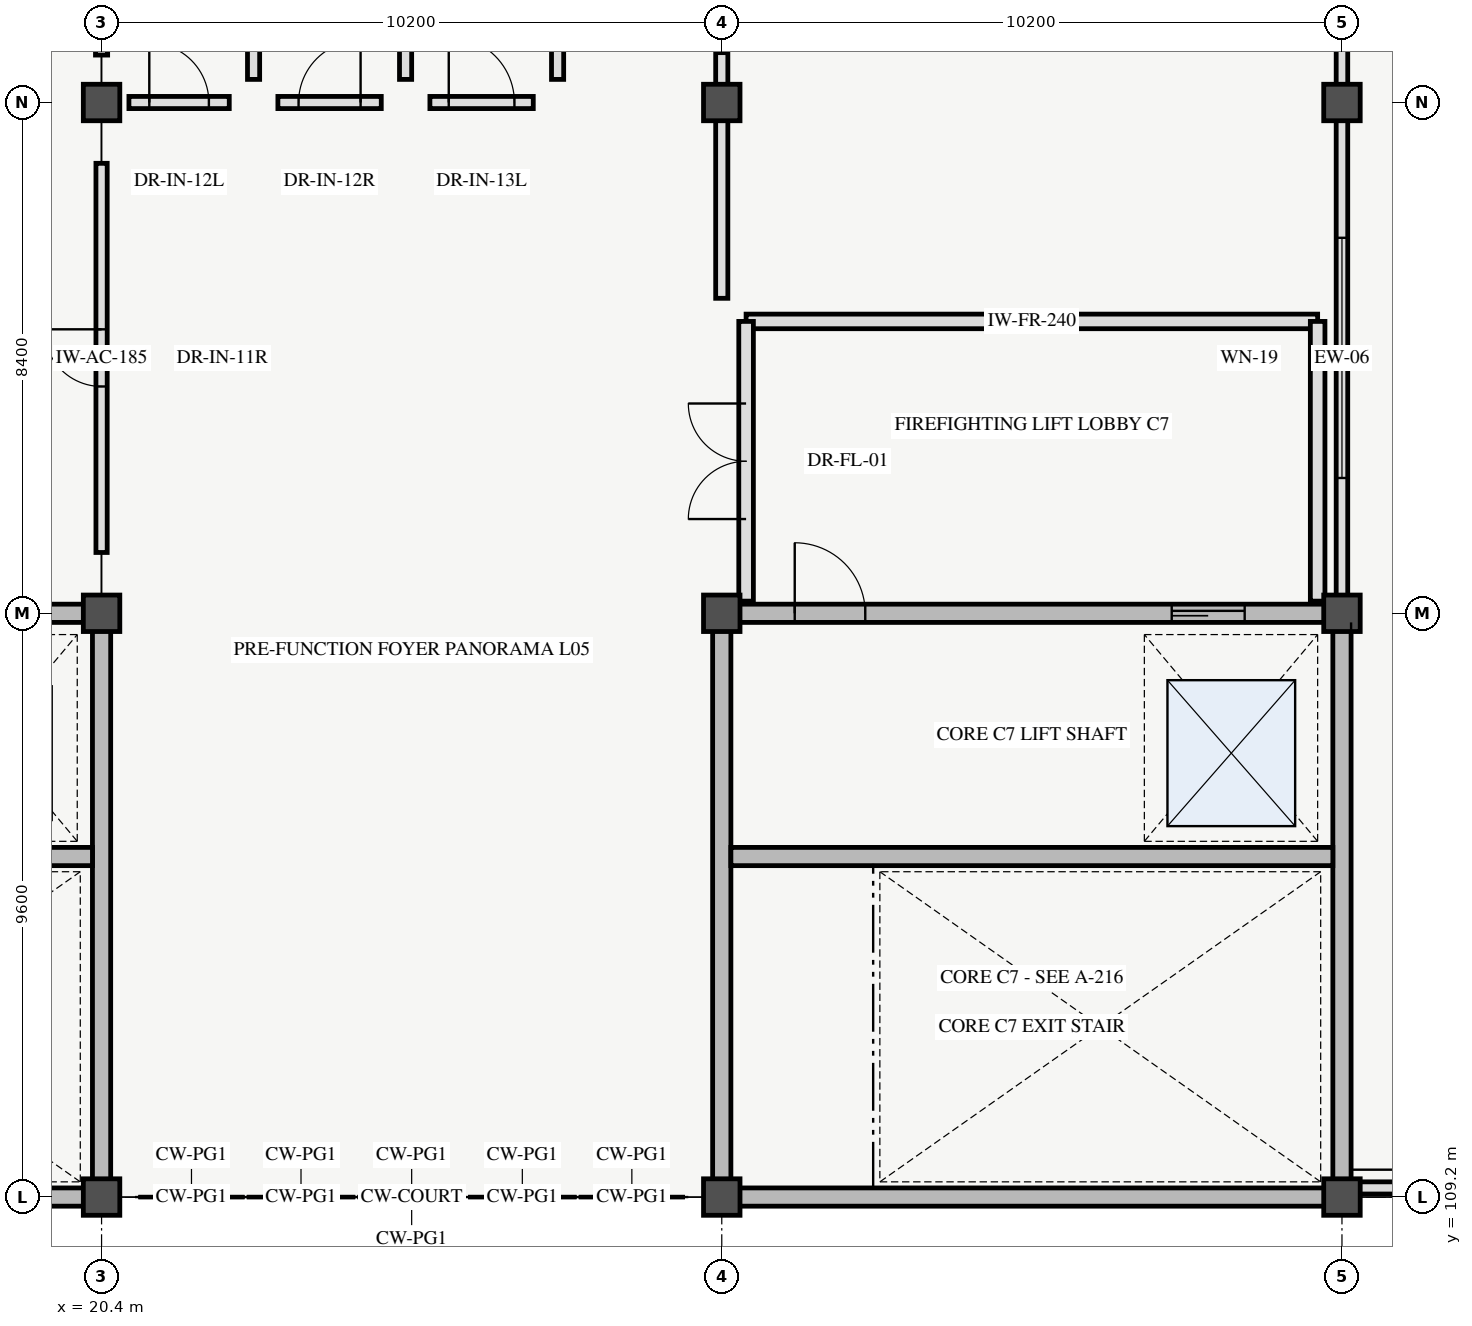
"""IFC4 building model, lengths in metres.
Left out: names, types, materials, properties, quantities, classifications, styles, units other than length and angle.
Written with IfcOpenShell. Run it as: python <this file> out.ifc"""

import sys

from ifc_helpers import new_model, si_unit, direction, frame, frame_2d, origin, origin_2d, place, context, subcontext, project, spatial, rectangle, extrude, element, fill, save


model = new_model("IFC4")
c1 = context("Model", 3, precision=1e-05, world=origin(), true_north=direction((0.0, 1.0)))
c2 = subcontext(c1, "Body", "Model", "MODEL_VIEW")
j1 = project(units=[si_unit("LENGTHUNIT", "METRE"), si_unit("PLANEANGLEUNIT", "RADIAN")], contexts=[c1])
p1 = place(None, origin())
s1 = spatial("IfcSite", under=j1, at=p1, CompositionType="ELEMENT")
p2 = place(p1, origin())
s2 = spatial("IfcBuilding", under=s1, at=p2, CompositionType="ELEMENT")
p3 = place(p2, frame((0.0, 0.0, 23.4)))
s3 = spatial("IfcBuildingStorey", under=s2, at=p3, CompositionType="ELEMENT", Elevation=23.4)
for number, where, z_axis, x_axis in (
    (1, (20.4, 109.2, 0.0), (0.0, 0.0, 1.0), (1.0, 0.0, 0.0)),
    (2, (20.4, 118.8, 0.0), (0.0, 0.0, 1.0), (1.0, 0.0, 0.0)),
    (3, (20.4, 127.2, 0.0), (0.0, 0.0, 1.0), (1.0, 0.0, 0.0)),
    (4, (30.6, 109.2, 0.0), (0.0, 0.0, 1.0), (1.0, 0.0, 0.0)),
    (5, (30.6, 118.8, 0.0), (0.0, 0.0, 1.0), (1.0, 0.0, 0.0)),
    (6, (30.6, 127.2, 0.0), (0.0, 0.0, 1.0), (1.0, 0.0, 0.0)),
    (7, (40.8, 109.2, 0.0), (0.0, 0.0, 1.0), (1.0, 0.0, 0.0)),
    (8, (40.8, 118.8, 0.0), (0.0, 0.0, 1.0), (1.0, 0.0, 0.0)),
    (9, (40.8, 127.2, 0.0), (0.0, 0.0, 1.0), (1.0, 0.0, 0.0)),
):
    element("IfcColumn", number, at=place(p3, frame(where, z_axis=z_axis, x_axis=x_axis)), inside=s3, PredefinedType="COLUMN", context=c2, shape_type="SweptSolid", body=[
        extrude(rectangle(XDim=0.6, YDim=0.6, at=origin_2d()), origin(), (0.0, 0.0, 1.0), 4.2),
    ])
p4 = place(p3, frame((10.2, 109.2, 0.0), z_axis=(0.0, 0.0, 1.0), x_axis=(1.0, 0.0, 0.0)))
e10 = element("IfcWall", 10, at=p4, inside=s3, PredefinedType="SHEAR", context=c2, shape_type="SweptSolid", body=[
    extrude(rectangle(XDim=10.2, YDim=0.3, at=frame_2d((5.1, 0.0))), origin(), (0.0, 0.0, 1.0), 4.2),
])
p5 = place(p3, frame((10.2, 118.8, 0.0), z_axis=(0.0, 0.0, 1.0), x_axis=(1.0, 0.0, 0.0)))
e11 = element("IfcWall", 11, at=p5, inside=s3, PredefinedType="SHEAR", context=c2, shape_type="SweptSolid", body=[
    extrude(rectangle(XDim=10.2, YDim=0.3, at=frame_2d((5.1, 0.0))), origin(), (0.0, 0.0, 1.0), 4.2),
])
p6 = place(p5, frame((1.2, 0.0, 0.0)))
e12 = element("IfcOpeningElement", 12, at=p6, cuts=e11, PredefinedType="OPENING", context=c2, shape_type="SweptSolid", body=[
    extrude(rectangle(XDim=1.16, YDim=2.2, at=frame_2d((0.58, 1.1))), frame((0.0, 0.16, 0.0), z_axis=(0.0, -1.0, 0.0), x_axis=(1.0, 0.0, 0.0)), (0.0, 0.0, 1.0), 0.32),
])
p7 = place(p5, frame((7.4, 0.0, 0.0)))
e13 = element("IfcOpeningElement", 13, at=p7, cuts=e11, PredefinedType="OPENING", context=c2, shape_type="SweptSolid", body=[
    extrude(rectangle(XDim=1.1, YDim=2.2, at=frame_2d((0.55, 1.1))), frame((0.0, 0.16, 0.0), z_axis=(0.0, -1.0, 0.0), x_axis=(1.0, 0.0, 0.0)), (0.0, 0.0, 1.0), 0.32),
])
p8 = place(p3, frame((20.4, 109.2, 0.0), z_axis=(0.0, 0.0, 1.0), x_axis=(0.0, 1.0, 0.0)))
e14 = element("IfcWall", 14, at=p8, inside=s3, PredefinedType="SHEAR", context=c2, shape_type="SweptSolid", body=[
    extrude(rectangle(XDim=9.6, YDim=0.3, at=frame_2d((4.8, 0.0))), origin(), (0.0, 0.0, 1.0), 4.2),
])
p9 = place(p3, frame((30.6, 109.2, 0.0), z_axis=(0.0, 0.0, 1.0), x_axis=(1.0, 0.0, 0.0)))
e15 = element("IfcWall", 15, at=p9, inside=s3, PredefinedType="SHEAR", context=c2, shape_type="SweptSolid", body=[
    extrude(rectangle(XDim=10.2, YDim=0.3, at=frame_2d((5.1, 0.0))), origin(), (0.0, 0.0, 1.0), 4.2),
])
p10 = place(p3, frame((30.6, 118.8, 0.0), z_axis=(0.0, 0.0, 1.0), x_axis=(1.0, 0.0, 0.0)))
e16 = element("IfcWall", 16, at=p10, inside=s3, PredefinedType="SHEAR", context=c2, shape_type="SweptSolid", body=[
    extrude(rectangle(XDim=10.2, YDim=0.3, at=frame_2d((5.1, 0.0))), origin(), (0.0, 0.0, 1.0), 4.2),
])
p11 = place(p10, frame((1.2, 0.0, 0.0)))
e17 = element("IfcOpeningElement", 17, at=p11, cuts=e16, PredefinedType="OPENING", context=c2, shape_type="SweptSolid", body=[
    extrude(rectangle(XDim=1.16, YDim=2.2, at=frame_2d((0.58, 1.1))), frame((0.0, 0.16, 0.0), z_axis=(0.0, -1.0, 0.0), x_axis=(1.0, 0.0, 0.0)), (0.0, 0.0, 1.0), 0.32),
])
p12 = place(p10, frame((7.4, 0.0, 0.0)))
e18 = element("IfcOpeningElement", 18, at=p12, cuts=e16, PredefinedType="OPENING", context=c2, shape_type="SweptSolid", body=[
    extrude(rectangle(XDim=1.2, YDim=2.25, at=frame_2d((0.6, 1.125))), frame((0.0, 0.16, 0.0), z_axis=(0.0, -1.0, 0.0), x_axis=(1.0, 0.0, 0.0)), (0.0, 0.0, 1.0), 0.32),
])
for number, where, z_axis, x_axis in (
    (19, (30.6, 109.2, 0.0), (0.0, 0.0, 1.0), (0.0, 1.0, 0.0)),
    (20, (40.8, 109.2, 0.0), (0.0, 0.0, 1.0), (0.0, 1.0, 0.0)),
):
    element("IfcWall", number, at=place(p3, frame(where, z_axis=z_axis, x_axis=x_axis)), inside=s3, PredefinedType="SHEAR", context=c2, shape_type="SweptSolid", body=[
        extrude(rectangle(XDim=9.6, YDim=0.3, at=frame_2d((4.8, 0.0))), origin(), (0.0, 0.0, 1.0), 4.2),
    ])
p13 = place(p3, frame((40.8, 119.04, 0.0), z_axis=(0.0, 0.0, 1.0), x_axis=(0.0, 1.0, 0.0)))
e21 = element("IfcWall", 21, at=p13, inside=s3, PredefinedType="STANDARD", context=c2, shape_type="SweptSolid", body=[
    extrude(rectangle(XDim=7.92, YDim=0.19, at=frame_2d((3.96, 0.0))), origin(), (0.0, 0.0, 1.0), 3.06),
])
p14 = place(p13, frame((1.985, 0.0, 0.9)))
e22 = element("IfcOpeningElement", 22, at=p14, cuts=e21, PredefinedType="OPENING", context=c2, shape_type="SweptSolid", body=[
    extrude(rectangle(XDim=3.95, YDim=2.02, at=frame_2d((1.975, 1.01))), frame((0.0, 0.105, 0.0), z_axis=(0.0, -1.0, 0.0), x_axis=(1.0, 0.0, 0.0)), (0.0, 0.0, 1.0), 0.21),
])
p15 = place(p3, frame((40.8, 127.44, 0.0), z_axis=(0.0, 0.0, 1.0), x_axis=(0.0, 1.0, 0.0)))
e23 = element("IfcWall", 23, at=p15, inside=s3, PredefinedType="STANDARD", context=c2, shape_type="SweptSolid", body=[
    extrude(rectangle(XDim=7.92, YDim=0.19, at=frame_2d((3.96, 0.0))), origin(), (0.0, 0.0, 1.0), 3.06),
])
p16 = place(p15, frame((2.91, 0.0, 0.0)))
e24 = element("IfcOpeningElement", 24, at=p16, cuts=e23, PredefinedType="OPENING", context=c2, shape_type="SweptSolid", body=[
    extrude(rectangle(XDim=2.1, YDim=2.3, at=frame_2d((1.05, 1.15))), frame((0.0, 0.105, 0.0), z_axis=(0.0, -1.0, 0.0), x_axis=(1.0, 0.0, 0.0)), (0.0, 0.0, 1.0), 0.21),
])
p17 = place(p3, frame((40.95, 109.35, 0.0), z_axis=(0.0, 0.0, 1.0), x_axis=(1.0, 0.0, 0.0)))
e25 = element("IfcWall", 25, at=p17, inside=s3, PredefinedType="PARAPET", context=c2, shape_type="SweptSolid", body=[
    extrude(rectangle(XDim=30.3, YDim=0.2, at=frame_2d((15.15, 0.0))), origin(), (0.0, 0.0, 1.0), 1.1),
])
for number, where, z_axis, x_axis in (
    (26, (10.35, 114.8, 0.0), (0.0, 0.0, 1.0), (1.0, 0.0, 0.0)),
    (27, (30.75, 114.8, 0.0), (0.0, 0.0, 1.0), (1.0, 0.0, 0.0)),
):
    element("IfcWall", number, at=place(p3, frame(where, z_axis=z_axis, x_axis=x_axis)), inside=s3, PredefinedType="SHEAR", context=c2, shape_type="SweptSolid", body=[
        extrude(rectangle(XDim=9.9, YDim=0.3, at=frame_2d((4.95, 0.0))), origin(), (0.0, 0.0, 1.0), 4.2),
    ])
p18 = place(p3, frame((31.0, 123.6, 0.0), z_axis=(0.0, 0.0, 1.0), x_axis=(1.0, 0.0, 0.0)))
e28 = element("IfcWall", 28, at=p18, inside=s3, PredefinedType="PARTITIONING", context=c2, shape_type="SweptSolid", body=[
    extrude(rectangle(XDim=9.4, YDim=0.24, at=frame_2d((4.7, 0.0))), origin(), (0.0, 0.0, 1.0), 3.06),
])
p19 = place(p3, frame((40.4, 119.0, 0.0), z_axis=(0.0, 0.0, 1.0), x_axis=(0.0, 1.0, 0.0)))
e29 = element("IfcWall", 29, at=p19, inside=s3, PredefinedType="PARTITIONING", context=c2, shape_type="SweptSolid", body=[
    extrude(rectangle(XDim=4.6, YDim=0.24, at=frame_2d((2.3, 0.0))), origin(), (0.0, 0.0, 1.0), 3.06),
])
p20 = place(p3, frame((31.0, 119.0, 0.0), z_axis=(0.0, 0.0, 1.0), x_axis=(0.0, 1.0, 0.0)))
e30 = element("IfcWall", 30, at=p20, inside=s3, PredefinedType="PARTITIONING", context=c2, shape_type="SweptSolid", body=[
    extrude(rectangle(XDim=4.6, YDim=0.24, at=frame_2d((2.3, 0.0))), origin(), (0.0, 0.0, 1.0), 3.06),
])
p21 = place(p20, frame((1.35, 0.0, 0.0)))
e31 = element("IfcOpeningElement", 31, at=p21, cuts=e30, PredefinedType="OPENING", context=c2, shape_type="SweptSolid", body=[
    extrude(rectangle(XDim=1.9, YDim=2.25, at=frame_2d((0.95, 1.125))), frame((0.0, 0.13, 0.0), z_axis=(0.0, -1.0, 0.0), x_axis=(1.0, 0.0, 0.0)), (0.0, 0.0, 1.0), 0.26),
])
p22 = place(p3, frame((20.4, 119.8, 0.0), z_axis=(0.0, 0.0, 1.0), x_axis=(0.0, 1.0, 0.0)))
e32 = element("IfcWall", 32, at=p22, inside=s3, PredefinedType="PARTITIONING", context=c2, shape_type="SweptSolid", body=[
    extrude(rectangle(XDim=6.4, YDim=0.185, at=frame_2d((3.2, 0.0))), origin(), (0.0, 0.0, 1.0), 3.06),
])
p23 = place(p22, frame((2.73, 0.0, 0.0)))
e33 = element("IfcOpeningElement", 33, at=p23, cuts=e32, PredefinedType="OPENING", context=c2, shape_type="SweptSolid", body=[
    extrude(rectangle(XDim=0.94, YDim=2.08, at=frame_2d((0.47, 1.04))), frame((0.0, 0.103, 0.0), z_axis=(0.0, -1.0, 0.0), x_axis=(1.0, 0.0, 0.0)), (0.0, 0.0, 1.0), 0.205),
])
p24 = place(p3, frame((20.85, 127.2, 0.0), z_axis=(0.0, 0.0, 1.0), x_axis=(1.0, 0.0, 0.0)))
e34 = element("IfcWall", 34, at=p24, inside=s3, PredefinedType="PARTITIONING", context=c2, shape_type="SweptSolid", body=[
    extrude(rectangle(XDim=1.65, YDim=0.2, at=frame_2d((0.825, 0.0))), origin(), (0.0, 0.0, 1.0), 3.06),
])
p25 = place(p24, frame((0.335, 0.0, 0.0)))
e35 = element("IfcOpeningElement", 35, at=p25, cuts=e34, PredefinedType="OPENING", context=c2, shape_type="SweptSolid", body=[
    extrude(rectangle(XDim=0.98, YDim=2.12, at=frame_2d((0.49, 1.06))), frame((0.0, 0.11, 0.0), z_axis=(0.0, -1.0, 0.0), x_axis=(1.0, 0.0, 0.0)), (0.0, 0.0, 1.0), 0.22),
])
p26 = place(p3, frame((23.3, 127.2, 0.0), z_axis=(0.0, 0.0, 1.0), x_axis=(1.0, 0.0, 0.0)))
e36 = element("IfcWall", 36, at=p26, inside=s3, PredefinedType="PARTITIONING", context=c2, shape_type="SweptSolid", body=[
    extrude(rectangle(XDim=1.7, YDim=0.2, at=frame_2d((0.85, 0.0))), origin(), (0.0, 0.0, 1.0), 3.06),
])
p27 = place(p26, frame((0.34, 0.0, 0.0)))
e37 = element("IfcOpeningElement", 37, at=p27, cuts=e36, PredefinedType="OPENING", context=c2, shape_type="SweptSolid", body=[
    extrude(rectangle(XDim=1.02, YDim=2.12, at=frame_2d((0.51, 1.06))), frame((0.0, 0.11, 0.0), z_axis=(0.0, -1.0, 0.0), x_axis=(1.0, 0.0, 0.0)), (0.0, 0.0, 1.0), 0.22),
])
p28 = place(p3, frame((25.8, 127.2, 0.0), z_axis=(0.0, 0.0, 1.0), x_axis=(1.0, 0.0, 0.0)))
e38 = element("IfcWall", 38, at=p28, inside=s3, PredefinedType="PARTITIONING", context=c2, shape_type="SweptSolid", body=[
    extrude(rectangle(XDim=1.7, YDim=0.2, at=frame_2d((0.85, 0.0))), origin(), (0.0, 0.0, 1.0), 3.06),
])
p29 = place(p28, frame((0.31, 0.0, 0.0)))
e39 = element("IfcOpeningElement", 39, at=p29, cuts=e38, PredefinedType="OPENING", context=c2, shape_type="SweptSolid", body=[
    extrude(rectangle(XDim=1.08, YDim=2.18, at=frame_2d((0.54, 1.09))), frame((0.0, 0.11, 0.0), z_axis=(0.0, -1.0, 0.0), x_axis=(1.0, 0.0, 0.0)), (0.0, 0.0, 1.0), 0.22),
])
p30 = place(p3, frame((20.4, 127.98, 0.0), z_axis=(0.0, 0.0, 1.0), x_axis=(0.0, 1.0, 0.0)))
e40 = element("IfcWall", 40, at=p30, inside=s3, PredefinedType="PARTITIONING", context=c2, shape_type="SweptSolid", body=[
    extrude(rectangle(XDim=7.24, YDim=0.2, at=frame_2d((3.62, 0.0))), origin(), (0.0, 0.0, 1.0), 3.06),
])
for number, where, z_axis, x_axis in (
    (41, (22.9, 127.58, 0.0), (0.0, 0.0, 1.0), (0.0, 1.0, 0.0)),
    (42, (25.4, 127.58, 0.0), (0.0, 0.0, 1.0), (0.0, 1.0, 0.0)),
    (43, (27.9, 127.58, 0.0), (0.0, 0.0, 1.0), (0.0, 1.0, 0.0)),
):
    element("IfcWall", number, at=place(p3, frame(where, z_axis=z_axis, x_axis=x_axis)), inside=s3, PredefinedType="PARTITIONING", context=c2, shape_type="SweptSolid", body=[
        extrude(rectangle(XDim=7.64, YDim=0.2, at=frame_2d((3.82, 0.0))), origin(), (0.0, 0.0, 1.0), 3.06),
    ])
p31 = place(p3, frame((30.6, 123.98, 0.0), z_axis=(0.0, 0.0, 1.0), x_axis=(0.0, 1.0, 0.0)))
e44 = element("IfcWall", 44, at=p31, inside=s3, PredefinedType="PARTITIONING", context=c2, shape_type="SweptSolid", body=[
    extrude(rectangle(XDim=4.04, YDim=0.2, at=frame_2d((2.02, 0.0))), origin(), (0.0, 0.0, 1.0), 3.06),
])
p32 = place(p14, origin())
e45 = element("IfcWindow", 45, at=p32, inside=s3, PartitioningType="TRIPLE_PANEL_VERTICAL", PredefinedType="WINDOW", context=c2, shape_type="SweptSolid", body=[
    extrude(rectangle(XDim=3.95, YDim=2.02, at=frame_2d((1.975, 1.01))), frame((0.0, 0.03, 0.0), z_axis=(0.0, -1.0, 0.0), x_axis=(1.0, 0.0, 0.0)), (0.0, 0.0, 1.0), 0.06),
])
fill(e22, e45)
p33 = place(p11, origin())
e46 = element("IfcDoor", 46, at=p33, inside=s3, OperationType="SINGLE_SWING_LEFT", PredefinedType="DOOR", context=c2, shape_type="SweptSolid", body=[
    extrude(rectangle(XDim=1.16, YDim=2.2, at=frame_2d((0.58, 1.1))), frame((0.0, 0.025, 0.0), z_axis=(0.0, -1.0, 0.0), x_axis=(1.0, 0.0, 0.0)), (0.0, 0.0, 1.0), 0.05),
])
fill(e17, e46)
p34 = place(p12, origin())
e47 = element("IfcDoor", 47, at=p34, inside=s3, OperationType="SLIDING_TO_LEFT", PredefinedType="DOOR", context=c2, shape_type="SweptSolid", body=[
    extrude(rectangle(XDim=1.2, YDim=2.25, at=frame_2d((0.6, 1.125))), frame((0.0, 0.025, 0.0), z_axis=(0.0, -1.0, 0.0), x_axis=(1.0, 0.0, 0.0)), (0.0, 0.0, 1.0), 0.05),
])
fill(e18, e47)
p35 = place(p21, origin())
e48 = element("IfcDoor", 48, at=p35, inside=s3, OperationType="DOUBLE_DOOR_SINGLE_SWING", PredefinedType="DOOR", context=c2, shape_type="SweptSolid", body=[
    extrude(rectangle(XDim=1.9, YDim=2.25, at=frame_2d((0.95, 1.125))), frame((0.0, 0.025, 0.0), z_axis=(0.0, -1.0, 0.0), x_axis=(1.0, 0.0, 0.0)), (0.0, 0.0, 1.0), 0.05),
])
fill(e31, e48)
p36 = place(p23, origin())
e49 = element("IfcDoor", 49, at=p36, inside=s3, OperationType="SINGLE_SWING_RIGHT", PredefinedType="DOOR", context=c2, shape_type="SweptSolid", body=[
    extrude(rectangle(XDim=0.94, YDim=2.08, at=frame_2d((0.47, 1.04))), frame((0.0, 0.025, 0.0), z_axis=(0.0, -1.0, 0.0), x_axis=(1.0, 0.0, 0.0)), (0.0, 0.0, 1.0), 0.05),
])
fill(e33, e49)
p37 = place(p25, origin())
e50 = element("IfcDoor", 50, at=p37, inside=s3, OperationType="SINGLE_SWING_LEFT", PredefinedType="DOOR", context=c2, shape_type="SweptSolid", body=[
    extrude(rectangle(XDim=0.98, YDim=2.12, at=frame_2d((0.49, 1.06))), frame((0.0, 0.025, 0.0), z_axis=(0.0, -1.0, 0.0), x_axis=(1.0, 0.0, 0.0)), (0.0, 0.0, 1.0), 0.05),
])
fill(e35, e50)
p38 = place(p27, origin())
e51 = element("IfcDoor", 51, at=p38, inside=s3, OperationType="SINGLE_SWING_RIGHT", PredefinedType="DOOR", context=c2, shape_type="SweptSolid", body=[
    extrude(rectangle(XDim=1.02, YDim=2.12, at=frame_2d((0.51, 1.06))), frame((0.0, 0.025, 0.0), z_axis=(0.0, -1.0, 0.0), x_axis=(1.0, 0.0, 0.0)), (0.0, 0.0, 1.0), 0.05),
])
fill(e37, e51)
p39 = place(p29, origin())
e52 = element("IfcDoor", 52, at=p39, inside=s3, OperationType="SINGLE_SWING_LEFT", PredefinedType="DOOR", context=c2, shape_type="SweptSolid", body=[
    extrude(rectangle(XDim=1.08, YDim=2.18, at=frame_2d((0.54, 1.09))), frame((0.0, 0.025, 0.0), z_axis=(0.0, -1.0, 0.0), x_axis=(1.0, 0.0, 0.0)), (0.0, 0.0, 1.0), 0.05),
])
fill(e39, e52)
save(model, sys.argv[1])
